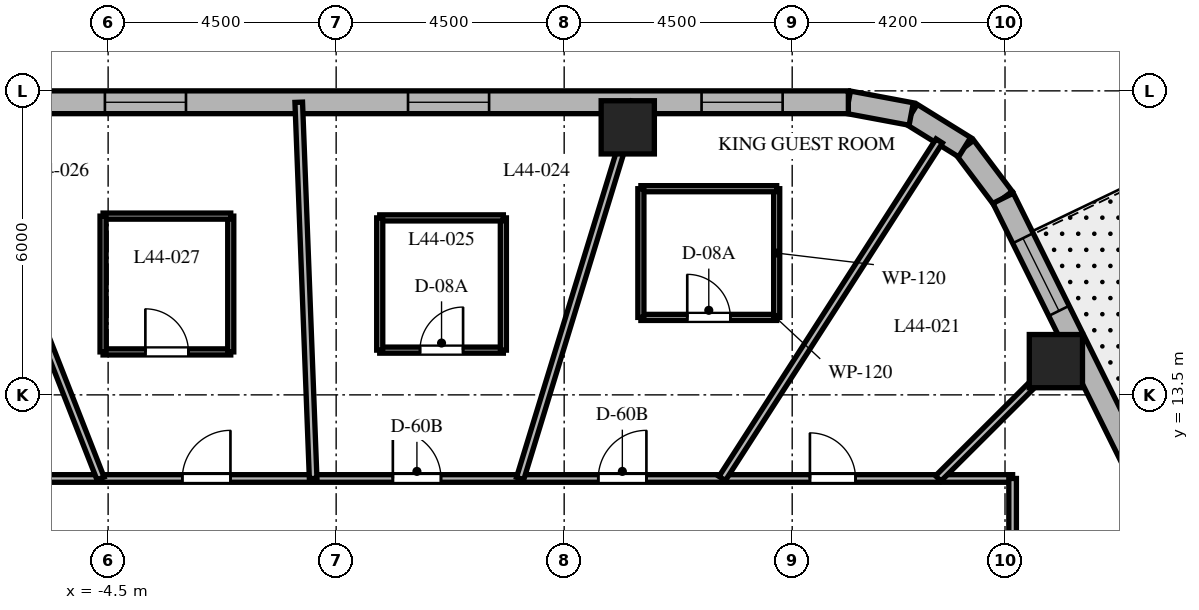
"""IFC4 building model, lengths in metres.
Left out: names, types, materials, properties, quantities, classifications, styles, units other than length and angle.
Written with IfcOpenShell. Run it as: python <this file> out.ifc"""

import sys

from ifc_helpers import new_model, si_unit, direction, frame, frame_2d, origin, origin_2d, place, context, subcontext, project, spatial, rectangle, extrude, element, fill, save


model = new_model("IFC4")
c1 = context("Model", 3, precision=1e-05, world=origin(), true_north=direction((0.0, 1.0)))
c2 = subcontext(c1, "Body", "Model", "MODEL_VIEW")
j1 = project(units=[si_unit("LENGTHUNIT", "METRE"), si_unit("PLANEANGLEUNIT", "RADIAN")], contexts=[c1])
p1 = place(None, origin())
s1 = spatial("IfcSite", under=j1, at=p1, CompositionType="ELEMENT")
p2 = place(p1, origin())
s2 = spatial("IfcBuilding", under=s1, at=p2, CompositionType="ELEMENT")
p3 = place(p2, frame((0.0, 0.0, 179.3)))
s3 = spatial("IfcBuildingStorey", under=s2, at=p3, CompositionType="ELEMENT", Elevation=179.3)
for number, where, z_axis, x_axis in (
    (1, (14.204, 14.166, 0.0), (0.0, 0.0, 1.0), (1.0, 0.0, 0.0)),
    (2, (5.755, 18.78, 0.0), (0.0, 0.0, 1.0), (1.0, 0.0, 0.0)),
):
    element("IfcColumn", number, at=place(p3, frame(where, z_axis=z_axis, x_axis=x_axis)), inside=s3, PredefinedType="COLUMN", context=c2, shape_type="SweptSolid", body=[
        extrude(rectangle(XDim=1.05, YDim=1.05, at=origin_2d()), origin(), (0.0, 0.0, 1.0), 3.7),
    ])
p4 = place(p3, frame((13.162, 17.381, 0.0), z_axis=(0.0, 0.0, 1.0), x_axis=(-0.601515770517, 0.798860925205, 0.0)))
e3 = element("IfcWall", 3, at=p4, inside=s3, PredefinedType="SOLIDWALL", context=c2, shape_type="SweptSolid", body=[
    extrude(rectangle(XDim=1.262, YDim=0.45, at=frame_2d((0.631, 0.0))), origin(), (0.0, 0.0, 1.0), 3.4),
])
p5 = place(p3, frame((12.403, 18.389, 0.0), z_axis=(0.0, 0.0, 1.0), x_axis=(-0.849795170926, 0.527113049991, 0.0)))
e4 = element("IfcWall", 4, at=p5, inside=s3, PredefinedType="SOLIDWALL", context=c2, shape_type="SweptSolid", body=[
    extrude(rectangle(XDim=1.241, YDim=0.45, at=frame_2d((0.62, 0.0))), origin(), (0.0, 0.0, 1.0), 3.4),
])
p6 = place(p3, frame((11.349, 19.043, 0.0), z_axis=(0.0, 0.0, 1.0), x_axis=(-0.982931267051, 0.183973161772, 0.0)))
e5 = element("IfcWall", 5, at=p6, inside=s3, PredefinedType="SOLIDWALL", context=c2, shape_type="SweptSolid", body=[
    extrude(rectangle(XDim=1.262, YDim=0.45, at=frame_2d((0.631, 0.0))), origin(), (0.0, 0.0, 1.0), 3.4),
])
p7 = place(p3, frame((20.618, 2.344, 0.0), z_axis=(0.0, 0.0, 1.0), x_axis=(-0.444243691097, 0.895905990002, 0.0)))
e6 = element("IfcWall", 6, at=p7, inside=s3, PredefinedType="SOLIDWALL", context=c2, shape_type="SweptSolid", body=[
    extrude(rectangle(XDim=16.784, YDim=0.45, at=frame_2d((8.392, 0.0))), origin(), (0.0, 0.0, 1.0), 3.4),
])
p8 = place(p7, frame((4.535, 0.0, 0.0)))
e7 = element("IfcOpeningElement", 7, at=p8, cuts=e6, PredefinedType="OPENING", context=c2, shape_type="SweptSolid", body=[
    extrude(rectangle(XDim=1.0, YDim=2.15, at=frame_2d((0.5, 1.075))), frame((0.0, 0.235, 0.0), z_axis=(0.0, -1.0, 0.0), x_axis=(1.0, 0.0, 0.0)), (0.0, 0.0, 1.0), 0.47),
])
p9 = place(p7, frame((0.931, 0.0, 0.8)))
e8 = element("IfcOpeningElement", 8, at=p9, cuts=e6, PredefinedType="OPENING", context=c2, shape_type="SweptSolid", body=[
    extrude(rectangle(XDim=1.6, YDim=1.75, at=frame_2d((0.8, 0.875))), frame((0.0, 0.235, 0.0), z_axis=(0.0, -1.0, 0.0), x_axis=(1.0, 0.0, 0.0)), (0.0, 0.0, 1.0), 0.47),
])
p10 = place(p7, frame((7.642, 0.0, 0.8)))
e9 = element("IfcOpeningElement", 9, at=p10, cuts=e6, PredefinedType="OPENING", context=c2, shape_type="SweptSolid", body=[
    extrude(rectangle(XDim=1.6, YDim=1.75, at=frame_2d((0.8, 0.875))), frame((0.0, 0.235, 0.0), z_axis=(0.0, -1.0, 0.0), x_axis=(1.0, 0.0, 0.0)), (0.0, 0.0, 1.0), 0.47),
])
p11 = place(p7, frame((14.303, 0.0, 0.8)))
e10 = element("IfcOpeningElement", 10, at=p11, cuts=e6, PredefinedType="OPENING", context=c2, shape_type="SweptSolid", body=[
    extrude(rectangle(XDim=1.6, YDim=1.75, at=frame_2d((0.8, 0.875))), frame((0.0, 0.235, 0.0), z_axis=(0.0, -1.0, 0.0), x_axis=(1.0, 0.0, 0.0)), (0.0, 0.0, 1.0), 0.47),
])
p12 = place(p3, frame((10.108, 19.275, 0.0), z_axis=(0.0, 0.0, 1.0), x_axis=(-1.0, 0.0, 0.0)))
e11 = element("IfcWall", 11, at=p12, inside=s3, PredefinedType="SOLIDWALL", context=c2, shape_type="SweptSolid", body=[
    extrude(rectangle(XDim=21.829, YDim=0.45, at=frame_2d((10.915, 0.0))), origin(), (0.0, 0.0, 1.0), 3.4),
])
p13 = place(p12, frame((1.297, 0.0, 0.8)))
e12 = element("IfcOpeningElement", 12, at=p13, cuts=e11, PredefinedType="OPENING", context=c2, shape_type="SweptSolid", body=[
    extrude(rectangle(XDim=1.6, YDim=1.75, at=frame_2d((0.8, 0.875))), frame((0.0, 0.235, 0.0), z_axis=(0.0, -1.0, 0.0), x_axis=(1.0, 0.0, 0.0)), (0.0, 0.0, 1.0), 0.47),
])
p14 = place(p12, frame((7.09, 0.0, 0.8)))
e13 = element("IfcOpeningElement", 13, at=p14, cuts=e11, PredefinedType="OPENING", context=c2, shape_type="SweptSolid", body=[
    extrude(rectangle(XDim=1.6, YDim=1.75, at=frame_2d((0.8, 0.875))), frame((0.0, 0.235, 0.0), z_axis=(0.0, -1.0, 0.0), x_axis=(1.0, 0.0, 0.0)), (0.0, 0.0, 1.0), 0.47),
])
p15 = place(p12, frame((13.072, 0.0, 0.8)))
e14 = element("IfcOpeningElement", 14, at=p15, cuts=e11, PredefinedType="OPENING", context=c2, shape_type="SweptSolid", body=[
    extrude(rectangle(XDim=1.6, YDim=1.75, at=frame_2d((0.8, 0.875))), frame((0.0, 0.235, 0.0), z_axis=(0.0, -1.0, 0.0), x_axis=(1.0, 0.0, 0.0)), (0.0, 0.0, 1.0), 0.47),
])
p16 = place(p12, frame((18.933, 0.0, 0.8)))
e15 = element("IfcOpeningElement", 15, at=p16, cuts=e11, PredefinedType="OPENING", context=c2, shape_type="SweptSolid", body=[
    extrude(rectangle(XDim=1.6, YDim=1.75, at=frame_2d((0.8, 0.875))), frame((0.0, 0.235, 0.0), z_axis=(0.0, -1.0, 0.0), x_axis=(1.0, 0.0, 0.0)), (0.0, 0.0, 1.0), 0.47),
])
p17 = place(p3, frame((-13.35, 11.85, 0.0), z_axis=(0.0, 0.0, 1.0), x_axis=(1.0, 0.0, 0.0)))
e16 = element("IfcWall", 16, at=p17, inside=s3, PredefinedType="PARTITIONING", context=c2, shape_type="SweptSolid", body=[
    extrude(rectangle(XDim=26.7, YDim=0.15, at=frame_2d((13.35, 0.0))), origin(), (0.0, 0.0, 1.0), 2.84),
])
p18 = place(p17, frame((22.7, 0.0, 0.0)))
e17 = element("IfcOpeningElement", 17, at=p18, cuts=e16, PredefinedType="OPENING", context=c2, shape_type="SweptSolid", body=[
    extrude(rectangle(XDim=0.9, YDim=2.03, at=frame_2d((0.45, 1.015))), frame((0.0, 0.085, 0.0), z_axis=(0.0, -1.0, 0.0), x_axis=(1.0, 0.0, 0.0)), (0.0, 0.0, 1.0), 0.17),
])
p19 = place(p17, frame((18.523, 0.0, 0.0)))
e18 = element("IfcOpeningElement", 18, at=p19, cuts=e16, PredefinedType="OPENING", context=c2, shape_type="SweptSolid", body=[
    extrude(rectangle(XDim=0.95, YDim=2.03, at=frame_2d((0.475, 1.015))), frame((0.0, 0.085, 0.0), z_axis=(0.0, -1.0, 0.0), x_axis=(1.0, 0.0, 0.0)), (0.0, 0.0, 1.0), 0.17),
])
p20 = place(p17, frame((14.469, 0.0, 0.0)))
e19 = element("IfcOpeningElement", 19, at=p20, cuts=e16, PredefinedType="OPENING", context=c2, shape_type="SweptSolid", body=[
    extrude(rectangle(XDim=0.95, YDim=2.03, at=frame_2d((0.475, 1.015))), frame((0.0, 0.085, 0.0), z_axis=(0.0, -1.0, 0.0), x_axis=(1.0, 0.0, 0.0)), (0.0, 0.0, 1.0), 0.17),
])
p21 = place(p17, frame((10.314, 0.0, 0.0)))
e20 = element("IfcOpeningElement", 20, at=p21, cuts=e16, PredefinedType="OPENING", context=c2, shape_type="SweptSolid", body=[
    extrude(rectangle(XDim=0.95, YDim=2.03, at=frame_2d((0.475, 1.015))), frame((0.0, 0.085, 0.0), z_axis=(0.0, -1.0, 0.0), x_axis=(1.0, 0.0, 0.0)), (0.0, 0.0, 1.0), 0.17),
])
p22 = place(p17, frame((6.061, 0.0, 0.0)))
e21 = element("IfcOpeningElement", 21, at=p22, cuts=e16, PredefinedType="OPENING", context=c2, shape_type="SweptSolid", body=[
    extrude(rectangle(XDim=0.95, YDim=2.03, at=frame_2d((0.475, 1.015))), frame((0.0, 0.085, 0.0), z_axis=(0.0, -1.0, 0.0), x_axis=(1.0, 0.0, 0.0)), (0.0, 0.0, 1.0), 0.17),
])
p23 = place(p17, frame((1.886, 0.0, 0.0)))
e22 = element("IfcOpeningElement", 22, at=p23, cuts=e16, PredefinedType="OPENING", context=c2, shape_type="SweptSolid", body=[
    extrude(rectangle(XDim=0.9, YDim=2.03, at=frame_2d((0.45, 1.015))), frame((0.0, 0.085, 0.0), z_axis=(0.0, -1.0, 0.0), x_axis=(1.0, 0.0, 0.0)), (0.0, 0.0, 1.0), 0.17),
])
p24 = place(p3, frame((13.35, 11.85, 0.0), z_axis=(0.0, 0.0, 1.0), x_axis=(0.0, -1.0, 0.0)))
e23 = element("IfcWall", 23, at=p24, inside=s3, PredefinedType="PARTITIONING", context=c2, shape_type="SweptSolid", body=[
    extrude(rectangle(XDim=23.7, YDim=0.15, at=frame_2d((11.85, 0.0))), origin(), (0.0, 0.0, 1.0), 2.84),
])
p25 = place(p24, frame((9.27, 0.0, 0.0)))
e24 = element("IfcOpeningElement", 24, at=p25, cuts=e23, PredefinedType="OPENING", context=c2, shape_type="SweptSolid", body=[
    extrude(rectangle(XDim=0.9, YDim=2.03, at=frame_2d((0.45, 1.015))), frame((0.0, 0.085, 0.0), z_axis=(0.0, -1.0, 0.0), x_axis=(1.0, 0.0, 0.0)), (0.0, 0.0, 1.0), 0.17),
])
p26 = place(p24, frame((3.765, 0.0, 0.0)))
e25 = element("IfcOpeningElement", 25, at=p26, cuts=e23, PredefinedType="OPENING", context=c2, shape_type="SweptSolid", body=[
    extrude(rectangle(XDim=0.9, YDim=2.03, at=frame_2d((0.45, 1.015))), frame((0.0, 0.085, 0.0), z_axis=(0.0, -1.0, 0.0), x_axis=(1.0, 0.0, 0.0)), (0.0, 0.0, 1.0), 0.17),
])
p27 = place(p24, frame((20.662, 0.0, 0.0)))
e26 = element("IfcOpeningElement", 26, at=p27, cuts=e23, PredefinedType="OPENING", context=c2, shape_type="SweptSolid", body=[
    extrude(rectangle(XDim=0.9, YDim=2.03, at=frame_2d((0.45, 1.015))), frame((0.0, 0.085, 0.0), z_axis=(0.0, -1.0, 0.0), x_axis=(1.0, 0.0, 0.0)), (0.0, 0.0, 1.0), 0.17),
])
p28 = place(p24, frame((16.055, 0.0, 0.0)))
e27 = element("IfcOpeningElement", 27, at=p28, cuts=e23, PredefinedType="OPENING", context=c2, shape_type="SweptSolid", body=[
    extrude(rectangle(XDim=0.95, YDim=2.03, at=frame_2d((0.475, 1.015))), frame((0.0, 0.085, 0.0), z_axis=(0.0, -1.0, 0.0), x_axis=(1.0, 0.0, 0.0)), (0.0, 0.0, 1.0), 0.17),
])
p29 = place(p24, frame((12.315, 0.0, 0.0)))
e28 = element("IfcOpeningElement", 28, at=p29, cuts=e23, PredefinedType="OPENING", context=c2, shape_type="SweptSolid", body=[
    extrude(rectangle(XDim=0.9, YDim=2.03, at=frame_2d((0.45, 1.015))), frame((0.0, 0.085, 0.0), z_axis=(0.0, -1.0, 0.0), x_axis=(1.0, 0.0, 0.0)), (0.0, 0.0, 1.0), 0.17),
])
p30 = place(p3, frame((11.882, 11.85, 0.0), z_axis=(0.0, 0.0, 1.0), x_axis=(0.708037373639, 0.706174962407, 0.0)))
e29 = element("IfcWall", 29, at=p30, inside=s3, PredefinedType="PARTITIONING", context=c2, shape_type="SweptSolid", body=[
    extrude(rectangle(XDim=3.802, YDim=0.15, at=frame_2d((1.901, 0.0))), origin(), (0.0, 0.0, 1.0), 2.64),
])
p31 = place(p3, frame((7.619, 11.85, 0.0), z_axis=(0.0, 0.0, 1.0), x_axis=(0.540829263478, 0.841132396098, 0.0)))
e30 = element("IfcWall", 30, at=p31, inside=s3, PredefinedType="PARTITIONING", context=c2, shape_type="SweptSolid", body=[
    extrude(rectangle(XDim=7.919, YDim=0.15, at=frame_2d((3.959, 0.0))), origin(), (0.0, 0.0, 1.0), 2.64),
])
p32 = place(p3, frame((3.631, 11.85, 0.0), z_axis=(0.0, 0.0, 1.0), x_axis=(0.293007573338, 0.956110120209, 0.0)))
e31 = element("IfcWall", 31, at=p32, inside=s3, PredefinedType="PARTITIONING", context=c2, shape_type="SweptSolid", body=[
    extrude(rectangle(XDim=7.766, YDim=0.15, at=frame_2d((3.883, 0.0))), origin(), (0.0, 0.0, 1.0), 2.64),
])
p33 = place(p3, frame((-0.454, 11.85, 0.0), z_axis=(0.0, 0.0, 1.0), x_axis=(-0.038279171143, 0.999267083945, 0.0)))
e32 = element("IfcWall", 32, at=p33, inside=s3, PredefinedType="PARTITIONING", context=c2, shape_type="SweptSolid", body=[
    extrude(rectangle(XDim=7.43, YDim=0.15, at=frame_2d((3.715, 0.0))), origin(), (0.0, 0.0, 1.0), 2.64),
])
p34 = place(p3, frame((-4.65, 11.85, 0.0), z_axis=(0.0, 0.0, 1.0), x_axis=(-0.365265947993, 0.930903210456, 0.0)))
e33 = element("IfcWall", 33, at=p34, inside=s3, PredefinedType="PARTITIONING", context=c2, shape_type="SweptSolid", body=[
    extrude(rectangle(XDim=7.976, YDim=0.15, at=frame_2d((3.988, 0.0))), origin(), (0.0, 0.0, 1.0), 2.64),
])
p35 = place(p3, frame((6.014, 15.029, 0.0), z_axis=(0.0, 0.0, 1.0), x_axis=(1.0, 0.0, 0.0)))
e34 = element("IfcWall", 34, at=p35, inside=s3, PredefinedType="PARTITIONING", context=c2, shape_type="SweptSolid", body=[
    extrude(rectangle(XDim=2.68, YDim=0.12, at=frame_2d((1.34, 0.0))), origin(), (0.0, 0.0, 1.0), 3.4),
])
p36 = place(p35, frame((0.915, 0.0, 0.0)))
e35 = element("IfcOpeningElement", 35, at=p36, cuts=e34, PredefinedType="OPENING", context=c2, shape_type="SweptSolid", body=[
    extrude(rectangle(XDim=0.85, YDim=2.03, at=frame_2d((0.425, 1.015))), frame((0.0, 0.07, 0.0), z_axis=(0.0, -1.0, 0.0), x_axis=(1.0, 0.0, 0.0)), (0.0, 0.0, 1.0), 0.14),
])
p37 = place(p3, frame((8.694, 15.029, 0.0), z_axis=(0.0, 0.0, 1.0), x_axis=(0.0, 1.0, 0.0)))
e36 = element("IfcWall", 36, at=p37, inside=s3, PredefinedType="PARTITIONING", context=c2, shape_type="SweptSolid", body=[
    extrude(rectangle(XDim=2.54, YDim=0.12, at=frame_2d((1.27, 0.0))), origin(), (0.0, 0.0, 1.0), 2.64),
])
p38 = place(p3, frame((8.694, 17.569, 0.0), z_axis=(0.0, 0.0, 1.0), x_axis=(-1.0, 0.0, 0.0)))
e37 = element("IfcWall", 37, at=p38, inside=s3, PredefinedType="PARTITIONING", context=c2, shape_type="SweptSolid", body=[
    extrude(rectangle(XDim=2.68, YDim=0.12, at=frame_2d((1.34, 0.0))), origin(), (0.0, 0.0, 1.0), 2.64),
])
p39 = place(p3, frame((6.014, 17.569, 0.0), z_axis=(0.0, 0.0, 1.0), x_axis=(0.0, -1.0, 0.0)))
e38 = element("IfcWall", 38, at=p39, inside=s3, PredefinedType="PARTITIONING", context=c2, shape_type="SweptSolid", body=[
    extrude(rectangle(XDim=2.54, YDim=0.12, at=frame_2d((1.27, 0.0))), origin(), (0.0, 0.0, 1.0), 3.4),
])
p40 = place(p3, frame((0.86, 14.383, 0.0), z_axis=(0.0, 0.0, 1.0), x_axis=(1.0, 0.0, 0.0)))
e39 = element("IfcWall", 39, at=p40, inside=s3, PredefinedType="PARTITIONING", context=c2, shape_type="SweptSolid", body=[
    extrude(rectangle(XDim=2.44, YDim=0.12, at=frame_2d((1.22, 0.0))), origin(), (0.0, 0.0, 1.0), 3.4),
])
p41 = place(p40, frame((0.795, 0.0, 0.0)))
e40 = element("IfcOpeningElement", 40, at=p41, cuts=e39, PredefinedType="OPENING", context=c2, shape_type="SweptSolid", body=[
    extrude(rectangle(XDim=0.85, YDim=2.03, at=frame_2d((0.425, 1.015))), frame((0.0, 0.07, 0.0), z_axis=(0.0, -1.0, 0.0), x_axis=(1.0, 0.0, 0.0)), (0.0, 0.0, 1.0), 0.14),
])
p42 = place(p3, frame((3.3, 14.383, 0.0), z_axis=(0.0, 0.0, 1.0), x_axis=(0.0, 1.0, 0.0)))
e41 = element("IfcWall", 41, at=p42, inside=s3, PredefinedType="PARTITIONING", context=c2, shape_type="SweptSolid", body=[
    extrude(rectangle(XDim=2.61, YDim=0.12, at=frame_2d((1.305, 0.0))), origin(), (0.0, 0.0, 1.0), 2.84),
])
p43 = place(p3, frame((3.3, 16.993, 0.0), z_axis=(0.0, 0.0, 1.0), x_axis=(-1.0, 0.0, 0.0)))
e42 = element("IfcWall", 42, at=p43, inside=s3, PredefinedType="PARTITIONING", context=c2, shape_type="SweptSolid", body=[
    extrude(rectangle(XDim=2.44, YDim=0.12, at=frame_2d((1.22, 0.0))), origin(), (0.0, 0.0, 1.0), 3.4),
])
p44 = place(p3, frame((0.86, 16.993, 0.0), z_axis=(0.0, 0.0, 1.0), x_axis=(0.0, -1.0, 0.0)))
e43 = element("IfcWall", 43, at=p44, inside=s3, PredefinedType="PARTITIONING", context=c2, shape_type="SweptSolid", body=[
    extrude(rectangle(XDim=2.61, YDim=0.12, at=frame_2d((1.305, 0.0))), origin(), (0.0, 0.0, 1.0), 2.84),
])
p45 = place(p3, frame((-4.6, 14.348, 0.0), z_axis=(0.0, 0.0, 1.0), x_axis=(1.0, 0.0, 0.0)))
e44 = element("IfcWall", 44, at=p45, inside=s3, PredefinedType="PARTITIONING", context=c2, shape_type="SweptSolid", body=[
    extrude(rectangle(XDim=2.52, YDim=0.12, at=frame_2d((1.26, 0.0))), origin(), (0.0, 0.0, 1.0), 3.4),
])
p46 = place(p45, frame((0.835, 0.0, 0.0)))
e45 = element("IfcOpeningElement", 45, at=p46, cuts=e44, PredefinedType="OPENING", context=c2, shape_type="SweptSolid", body=[
    extrude(rectangle(XDim=0.85, YDim=2.03, at=frame_2d((0.425, 1.015))), frame((0.0, 0.07, 0.0), z_axis=(0.0, -1.0, 0.0), x_axis=(1.0, 0.0, 0.0)), (0.0, 0.0, 1.0), 0.14),
])
p47 = place(p3, frame((-2.08, 14.348, 0.0), z_axis=(0.0, 0.0, 1.0), x_axis=(0.0, 1.0, 0.0)))
e46 = element("IfcWall", 46, at=p47, inside=s3, PredefinedType="PARTITIONING", context=c2, shape_type="SweptSolid", body=[
    extrude(rectangle(XDim=2.68, YDim=0.12, at=frame_2d((1.34, 0.0))), origin(), (0.0, 0.0, 1.0), 2.84),
])
p48 = place(p3, frame((-2.08, 17.028, 0.0), z_axis=(0.0, 0.0, 1.0), x_axis=(-1.0, 0.0, 0.0)))
e47 = element("IfcWall", 47, at=p48, inside=s3, PredefinedType="PARTITIONING", context=c2, shape_type="SweptSolid", body=[
    extrude(rectangle(XDim=2.52, YDim=0.12, at=frame_2d((1.26, 0.0))), origin(), (0.0, 0.0, 1.0), 3.4),
])
p49 = place(p3, frame((-4.6, 17.028, 0.0), z_axis=(0.0, 0.0, 1.0), x_axis=(0.0, -1.0, 0.0)))
e48 = element("IfcWall", 48, at=p49, inside=s3, PredefinedType="PARTITIONING", context=c2, shape_type="SweptSolid", body=[
    extrude(rectangle(XDim=2.68, YDim=0.12, at=frame_2d((1.34, 0.0))), origin(), (0.0, 0.0, 1.0), 2.84),
])
p50 = place(p11, origin())
e49 = element("IfcWindow", 49, at=p50, inside=s3, PartitioningType="SINGLE_PANEL", PredefinedType="WINDOW", context=c2, shape_type="SweptSolid", body=[
    extrude(rectangle(XDim=1.6, YDim=1.75, at=frame_2d((0.8, 0.875))), frame((0.0, 0.03, 0.0), z_axis=(0.0, -1.0, 0.0), x_axis=(1.0, 0.0, 0.0)), (0.0, 0.0, 1.0), 0.06),
])
fill(e10, e49)
p51 = place(p13, origin())
e50 = element("IfcWindow", 50, at=p51, inside=s3, PartitioningType="SINGLE_PANEL", PredefinedType="WINDOW", context=c2, shape_type="SweptSolid", body=[
    extrude(rectangle(XDim=1.6, YDim=1.75, at=frame_2d((0.8, 0.875))), frame((0.0, 0.03, 0.0), z_axis=(0.0, -1.0, 0.0), x_axis=(1.0, 0.0, 0.0)), (0.0, 0.0, 1.0), 0.06),
])
fill(e12, e50)
p52 = place(p14, origin())
e51 = element("IfcWindow", 51, at=p52, inside=s3, PartitioningType="SINGLE_PANEL", PredefinedType="WINDOW", context=c2, shape_type="SweptSolid", body=[
    extrude(rectangle(XDim=1.6, YDim=1.75, at=frame_2d((0.8, 0.875))), frame((0.0, 0.03, 0.0), z_axis=(0.0, -1.0, 0.0), x_axis=(1.0, 0.0, 0.0)), (0.0, 0.0, 1.0), 0.06),
])
fill(e13, e51)
p53 = place(p15, origin())
e52 = element("IfcWindow", 52, at=p53, inside=s3, PartitioningType="SINGLE_PANEL", PredefinedType="WINDOW", context=c2, shape_type="SweptSolid", body=[
    extrude(rectangle(XDim=1.6, YDim=1.75, at=frame_2d((0.8, 0.875))), frame((0.0, 0.03, 0.0), z_axis=(0.0, -1.0, 0.0), x_axis=(1.0, 0.0, 0.0)), (0.0, 0.0, 1.0), 0.06),
])
fill(e14, e52)
p54 = place(p18, origin())
e53 = element("IfcDoor", 53, at=p54, inside=s3, OperationType="SINGLE_SWING_LEFT", PredefinedType="DOOR", context=c2, shape_type="SweptSolid", body=[
    extrude(rectangle(XDim=0.9, YDim=2.03, at=frame_2d((0.45, 1.015))), frame((0.0, 0.025, 0.0), z_axis=(0.0, -1.0, 0.0), x_axis=(1.0, 0.0, 0.0)), (0.0, 0.0, 1.0), 0.05),
])
fill(e17, e53)
p55 = place(p19, origin())
e54 = element("IfcDoor", 54, at=p55, inside=s3, OperationType="SINGLE_SWING_RIGHT", PredefinedType="DOOR", context=c2, shape_type="SweptSolid", body=[
    extrude(rectangle(XDim=0.95, YDim=2.03, at=frame_2d((0.475, 1.015))), frame((0.0, 0.025, 0.0), z_axis=(0.0, -1.0, 0.0), x_axis=(1.0, 0.0, 0.0)), (0.0, 0.0, 1.0), 0.05),
])
fill(e18, e54)
p56 = place(p36, origin())
e55 = element("IfcDoor", 55, at=p56, inside=s3, OperationType="SINGLE_SWING_LEFT", PredefinedType="DOOR", context=c2, shape_type="SweptSolid", body=[
    extrude(rectangle(XDim=0.85, YDim=2.03, at=frame_2d((0.425, 1.015))), frame((0.0, 0.025, 0.0), z_axis=(0.0, -1.0, 0.0), x_axis=(1.0, 0.0, 0.0)), (0.0, 0.0, 1.0), 0.05),
])
fill(e35, e55)
p57 = place(p20, origin())
e56 = element("IfcDoor", 56, at=p57, inside=s3, OperationType="SINGLE_SWING_LEFT", PredefinedType="DOOR", context=c2, shape_type="SweptSolid", body=[
    extrude(rectangle(XDim=0.95, YDim=2.03, at=frame_2d((0.475, 1.015))), frame((0.0, 0.025, 0.0), z_axis=(0.0, -1.0, 0.0), x_axis=(1.0, 0.0, 0.0)), (0.0, 0.0, 1.0), 0.05),
])
fill(e19, e56)
p58 = place(p41, origin())
e57 = element("IfcDoor", 57, at=p58, inside=s3, OperationType="SINGLE_SWING_RIGHT", PredefinedType="DOOR", context=c2, shape_type="SweptSolid", body=[
    extrude(rectangle(XDim=0.85, YDim=2.03, at=frame_2d((0.425, 1.015))), frame((0.0, 0.025, 0.0), z_axis=(0.0, -1.0, 0.0), x_axis=(1.0, 0.0, 0.0)), (0.0, 0.0, 1.0), 0.05),
])
fill(e40, e57)
p59 = place(p21, origin())
e58 = element("IfcDoor", 58, at=p59, inside=s3, OperationType="SINGLE_SWING_RIGHT", PredefinedType="DOOR", context=c2, shape_type="SweptSolid", body=[
    extrude(rectangle(XDim=0.95, YDim=2.03, at=frame_2d((0.475, 1.015))), frame((0.0, 0.025, 0.0), z_axis=(0.0, -1.0, 0.0), x_axis=(1.0, 0.0, 0.0)), (0.0, 0.0, 1.0), 0.05),
])
fill(e20, e58)
p60 = place(p46, origin())
e59 = element("IfcDoor", 59, at=p60, inside=s3, OperationType="SINGLE_SWING_LEFT", PredefinedType="DOOR", context=c2, shape_type="SweptSolid", body=[
    extrude(rectangle(XDim=0.85, YDim=2.03, at=frame_2d((0.425, 1.015))), frame((0.0, 0.025, 0.0), z_axis=(0.0, -1.0, 0.0), x_axis=(1.0, 0.0, 0.0)), (0.0, 0.0, 1.0), 0.05),
])
fill(e45, e59)
save(model, sys.argv[1])
